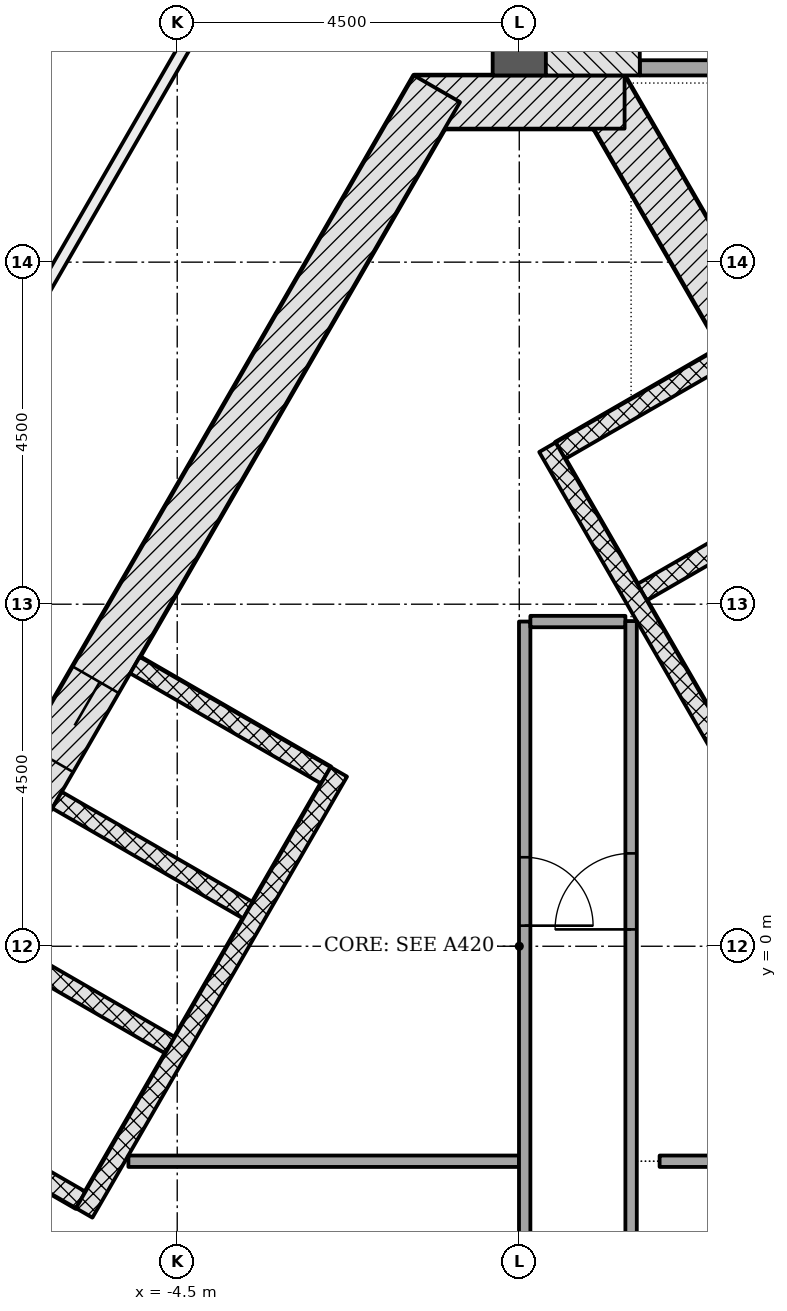
"""IFC4 building model, lengths in metres.
Left out: names, types, materials, properties, quantities, classifications, styles, units other than length and angle.
Written with IfcOpenShell. Run it as: python <this file> out.ifc"""

import sys

from ifc_helpers import new_model, si_unit, direction, frame, frame_2d, origin, place, context, subcontext, project, spatial, rectangle, extrude, element, fill, save


model = new_model("IFC4")
c1 = context("Model", 3, precision=1e-05, world=origin(), true_north=direction((0.0, 1.0)))
c2 = subcontext(c1, "Body", "Model", "MODEL_VIEW")
j1 = project(units=[si_unit("LENGTHUNIT", "METRE"), si_unit("PLANEANGLEUNIT", "RADIAN")], contexts=[c1])
p1 = place(None, origin())
s1 = spatial("IfcSite", under=j1, at=p1, CompositionType="ELEMENT")
p2 = place(p1, origin())
s2 = spatial("IfcBuilding", under=s1, at=p2, CompositionType="ELEMENT")
p3 = place(p2, frame((0.0, 0.0, 185.1)))
s3 = spatial("IfcBuildingStorey", under=s2, at=p3, CompositionType="ELEMENT", Elevation=185.1)
p4 = place(p3, frame((10.311, -4.703, -0.2), z_axis=(0.0, 0.0, 1.0), x_axis=(-0.500001446645, 0.866024568562, 0.0)))
e1 = element("IfcWall", 1, at=p4, inside=s3, PredefinedType="SHEAR", context=c2, shape_type="SweptSolid", body=[
    extrude(rectangle(XDim=18.458, YDim=0.7, at=frame_2d((9.229, 0.0))), origin(), (0.0, 0.0, 1.0), 3.6),
])
p5 = place(p4, frame((4.379, 0.0, 0.2)))
e2 = element("IfcOpeningElement", 2, at=p5, cuts=e1, PredefinedType="OPENING", context=c2, shape_type="SweptSolid", body=[
    extrude(rectangle(XDim=1.1, YDim=2.1, at=frame_2d((0.55, 1.05))), frame((0.0, 0.36, 0.0), z_axis=(0.0, -1.0, 0.0), x_axis=(1.0, 0.0, 0.0)), (0.0, 0.0, 1.0), 0.72),
])
p6 = place(p4, frame((6.529, 0.0, 0.2)))
e3 = element("IfcOpeningElement", 3, at=p6, cuts=e1, PredefinedType="OPENING", context=c2, shape_type="SweptSolid", body=[
    extrude(rectangle(XDim=1.1, YDim=2.1, at=frame_2d((0.55, 1.05))), frame((0.0, 0.36, 0.0), z_axis=(0.0, -1.0, 0.0), x_axis=(1.0, 0.0, 0.0)), (0.0, 0.0, 1.0), 0.72),
])
p7 = place(p4, frame((8.679, 0.0, 0.2)))
e4 = element("IfcOpeningElement", 4, at=p7, cuts=e1, PredefinedType="OPENING", context=c2, shape_type="SweptSolid", body=[
    extrude(rectangle(XDim=1.1, YDim=2.1, at=frame_2d((0.55, 1.05))), frame((0.0, 0.36, 0.0), z_axis=(0.0, -1.0, 0.0), x_axis=(1.0, 0.0, 0.0)), (0.0, 0.0, 1.0), 0.72),
])
p8 = place(p4, frame((10.829, 0.0, 0.2)))
e5 = element("IfcOpeningElement", 5, at=p8, cuts=e1, PredefinedType="OPENING", context=c2, shape_type="SweptSolid", body=[
    extrude(rectangle(XDim=1.1, YDim=2.1, at=frame_2d((0.55, 1.05))), frame((0.0, 0.36, 0.0), z_axis=(0.0, -1.0, 0.0), x_axis=(1.0, 0.0, 0.0)), (0.0, 0.0, 1.0), 0.72),
])
p9 = place(p4, frame((12.979, 0.0, 0.2)))
e6 = element("IfcOpeningElement", 6, at=p9, cuts=e1, PredefinedType="OPENING", context=c2, shape_type="SweptSolid", body=[
    extrude(rectangle(XDim=1.1, YDim=2.1, at=frame_2d((0.55, 1.05))), frame((0.0, 0.36, 0.0), z_axis=(0.0, -1.0, 0.0), x_axis=(1.0, 0.0, 0.0)), (0.0, 0.0, 1.0), 0.72),
])
p10 = place(p3, frame((1.386, 11.106, -0.2), z_axis=(0.0, 0.0, 1.0), x_axis=(-1.0, 0.0, 0.0)))
e7 = element("IfcWall", 7, at=p10, inside=s3, PredefinedType="SHEAR", context=c2, shape_type="SweptSolid", body=[
    extrude(rectangle(XDim=2.771, YDim=0.7, at=frame_2d((1.386, 0.0))), origin(), (0.0, 0.0, 1.0), 3.6),
])
p11 = place(p3, frame((-1.083, 11.281, -0.2), z_axis=(0.0, 0.0, 1.0), x_axis=(-0.500001446645, -0.866024568562, 0.0)))
e8 = element("IfcWall", 8, at=p11, inside=s3, PredefinedType="SHEAR", context=c2, shape_type="SweptSolid", body=[
    extrude(rectangle(XDim=18.458, YDim=0.7, at=frame_2d((9.229, 0.0))), origin(), (0.0, 0.0, 1.0), 3.6),
])
p12 = place(p11, frame((8.979, 0.0, 0.2)))
e9 = element("IfcOpeningElement", 9, at=p12, cuts=e8, PredefinedType="OPENING", context=c2, shape_type="SweptSolid", body=[
    extrude(rectangle(XDim=1.2, YDim=2.1, at=frame_2d((0.6, 1.05))), frame((0.0, 0.36, 0.0), z_axis=(0.0, -1.0, 0.0), x_axis=(1.0, 0.0, 0.0)), (0.0, 0.0, 1.0), 0.72),
])
p13 = place(p11, frame((11.029, 0.0, 0.2)))
e10 = element("IfcOpeningElement", 10, at=p13, cuts=e8, PredefinedType="OPENING", context=c2, shape_type="SweptSolid", body=[
    extrude(rectangle(XDim=1.2, YDim=2.1, at=frame_2d((0.6, 1.05))), frame((0.0, 0.36, 0.0), z_axis=(0.0, -1.0, 0.0), x_axis=(1.0, 0.0, 0.0)), (0.0, 0.0, 1.0), 0.72),
])
p14 = place(p3, frame((0.0, 11.456, -0.2), z_axis=(0.0, 0.0, 1.0), x_axis=(0.0, 1.0, 0.0)))
e11 = element("IfcWall", 11, at=p14, inside=s3, PredefinedType="SHEAR", context=c2, shape_type="SweptSolid", body=[
    extrude(rectangle(XDim=9.522, YDim=0.7, at=frame_2d((4.761, 0.0))), origin(), (0.0, 0.0, 1.0), 3.6),
])
for number, where, z_axis, x_axis in (
    (12, (3.781, 5.907, -0.2), (0.0, 0.0, 1.0), (-0.866, -0.5, 0.0)),
    (13, (2.706, 7.769, -0.2), (0.0, 0.0, 1.0), (-0.866, -0.5, 0.0)),
):
    element("IfcWall", number, at=place(p3, frame(where, z_axis=z_axis, x_axis=x_axis)), inside=s3, PredefinedType="PARTITIONING", context=c2, shape_type="SweptSolid", body=[
        extrude(rectangle(XDim=2.5, YDim=0.25, at=frame_2d((1.25, 0.0))), origin(), (0.0, 0.0, 1.0), 3.6),
    ])
p15 = place(p3, frame((5.87, -2.961, 0.0), z_axis=(0.0, 0.0, 1.0), x_axis=(-0.50000615651, 0.866021849293, 0.0)))
e14 = element("IfcWall", 14, at=p15, inside=s3, PredefinedType="PARTITIONING", context=c2, shape_type="SweptSolid", body=[
    extrude(rectangle(XDim=11.0, YDim=0.25, at=frame_2d((5.5, 0.0))), origin(), (0.0, 0.0, 1.0), 3.4),
])
for number, where, z_axis, x_axis in (
    (15, (-5.056, 3.699, -0.2), (0.0, 0.0, 1.0), (0.866, -0.5, 0.0)),
    (16, (-6.081, 1.923, -0.2), (0.0, 0.0, 1.0), (0.866, -0.5, 0.0)),
    (17, (-7.106, 0.148, -0.2), (0.0, 0.0, 1.0), (0.866, -0.5, 0.0)),
    (18, (-8.281, -1.887, -0.2), (0.0, 0.0, 1.0), (0.866, -0.5, 0.0)),
):
    element("IfcWall", number, at=place(p3, frame(where, z_axis=z_axis, x_axis=x_axis)), inside=s3, PredefinedType="PARTITIONING", context=c2, shape_type="SweptSolid", body=[
        extrude(rectangle(XDim=2.9, YDim=0.25, at=frame_2d((1.45, 0.0))), origin(), (0.0, 0.0, 1.0), 3.6),
    ])
p16 = place(p3, frame((-2.374, 2.294, 0.0), z_axis=(0.0, 0.0, 1.0), x_axis=(-0.500003174267, -0.866023571113, 0.0)))
e19 = element("IfcWall", 19, at=p16, inside=s3, PredefinedType="PARTITIONING", context=c2, shape_type="SweptSolid", body=[
    extrude(rectangle(XDim=6.7, YDim=0.25, at=frame_2d((3.35, 0.0))), origin(), (0.0, 0.0, 1.0), 3.4),
])
p17 = place(p3, frame((-5.142, -2.828, 0.0), z_axis=(0.0, 0.0, 1.0), x_axis=(1.0, 0.0, 0.0)))
e20 = element("IfcWall", 20, at=p17, inside=s3, PredefinedType="PARTITIONING", context=c2, shape_type="SweptSolid", body=[
    extrude(rectangle(XDim=5.139, YDim=0.15, at=frame_2d((2.569, 0.0))), origin(), (0.0, 0.0, 1.0), 3.4),
])
p18 = place(p3, frame((0.071, 4.272, 0.0), z_axis=(0.0, 0.0, 1.0), x_axis=(0.0, -1.0, 0.0)))
e21 = element("IfcWall", 21, at=p18, inside=s3, PredefinedType="PARTITIONING", context=c2, shape_type="SweptSolid", body=[
    extrude(rectangle(XDim=10.5, YDim=0.15, at=frame_2d((5.25, 0.0))), origin(), (0.0, 0.0, 1.0), 3.4),
])
p19 = place(p18, frame((3.101, 0.0, 0.0)))
e22 = element("IfcOpeningElement", 22, at=p19, cuts=e21, PredefinedType="OPENING", context=c2, shape_type="SweptSolid", body=[
    extrude(rectangle(XDim=0.9, YDim=2.1, at=frame_2d((0.45, 1.05))), frame((0.0, 0.085, 0.0), z_axis=(0.0, -1.0, 0.0), x_axis=(1.0, 0.0, 0.0)), (0.0, 0.0, 1.0), 0.17),
])
p20 = place(p3, frame((0.146, 4.272, 0.0), z_axis=(0.0, 0.0, 1.0), x_axis=(1.0, 0.0, 0.0)))
e23 = element("IfcWall", 23, at=p20, inside=s3, PredefinedType="PARTITIONING", context=c2, shape_type="SweptSolid", body=[
    extrude(rectangle(XDim=1.25, YDim=0.15, at=frame_2d((0.625, 0.0))), origin(), (0.0, 0.0, 1.0), 3.4),
])
p21 = place(p3, frame((1.471, -5.928, 0.0), z_axis=(0.0, 0.0, 1.0), x_axis=(0.0, 1.0, 0.0)))
e24 = element("IfcWall", 24, at=p21, inside=s3, PredefinedType="PARTITIONING", context=c2, shape_type="SweptSolid", body=[
    extrude(rectangle(XDim=10.206, YDim=0.15, at=frame_2d((5.103, 0.0))), origin(), (0.0, 0.0, 1.0), 3.4),
])
p22 = place(p21, frame((6.15, 0.0, 0.0)))
e25 = element("IfcOpeningElement", 25, at=p22, cuts=e24, PredefinedType="OPENING", context=c2, shape_type="SweptSolid", body=[
    extrude(rectangle(XDim=1.0, YDim=2.1, at=frame_2d((0.5, 1.05))), frame((0.0, 0.085, 0.0), z_axis=(0.0, -1.0, 0.0), x_axis=(1.0, 0.0, 0.0)), (0.0, 0.0, 1.0), 0.17),
])
p23 = place(p3, frame((1.846, -2.828, 0.0), z_axis=(0.0, 0.0, 1.0), x_axis=(1.0, 0.0, 0.0)))
e26 = element("IfcWall", 26, at=p23, inside=s3, PredefinedType="PARTITIONING", context=c2, shape_type="SweptSolid", body=[
    extrude(rectangle(XDim=3.758, YDim=0.15, at=frame_2d((1.879, 0.0))), origin(), (0.0, 0.0, 1.0), 3.4),
])
p24 = place(p3, frame((5.135, 11.556, -0.2), z_axis=(0.0, 0.0, 1.0), x_axis=(-1.0, 0.0, 0.0)))
e27 = element("IfcWall", 27, at=p24, inside=s3, PredefinedType="SHEAR", context=c2, shape_type="SweptSolid", body=[
    extrude(rectangle(XDim=3.55, YDim=0.2, at=frame_2d((1.775, 0.0))), origin(), (0.0, 0.0, 1.0), 3.6),
])
p25 = place(p24, frame((1.175, 0.0, 0.2)))
e28 = element("IfcOpeningElement", 28, at=p25, cuts=e27, PredefinedType="OPENING", context=c2, shape_type="SweptSolid", body=[
    extrude(rectangle(XDim=1.2, YDim=2.1, at=frame_2d((0.6, 1.05))), frame((0.0, 0.11, 0.0), z_axis=(0.0, -1.0, 0.0), x_axis=(1.0, 0.0, 0.0)), (0.0, 0.0, 1.0), 0.22),
])
p26 = place(p3, frame((0.968, 11.456, -0.2), z_axis=(0.0, 0.0, 1.0), x_axis=(0.0, 1.0, 0.0)))
e29 = element("IfcWall", 29, at=p26, inside=s3, PredefinedType="SHEAR", context=c2, shape_type="SweptSolid", body=[
    extrude(rectangle(XDim=7.2, YDim=1.236, at=frame_2d((3.6, 0.0))), origin(), (0.0, 0.0, 1.0), 3.6),
])
p27 = place(p3, frame((-0.35, 18.85, 0.0), z_axis=(0.0, 0.0, 1.0), x_axis=(-0.500005388685, -0.866022292603, 0.0)))
e30 = element("IfcWall", 30, at=p27, inside=s3, PredefinedType="PARTITIONING", context=c2, shape_type="SweptSolid", body=[
    extrude(rectangle(XDim=14.167, YDim=0.15, at=frame_2d((7.083, 0.0))), origin(), (0.0, 0.0, 1.0), 2.847),
])
p28 = place(p12, origin())
e31 = element("IfcDoor", 31, at=p28, inside=s3, OperationType="DOUBLE_DOOR_SLIDING", PredefinedType="DOOR", context=c2, shape_type="SweptSolid", body=[
    extrude(rectangle(XDim=1.2, YDim=2.1, at=frame_2d((0.6, 1.05))), frame((0.0, 0.025, 0.0), z_axis=(0.0, -1.0, 0.0), x_axis=(1.0, 0.0, 0.0)), (0.0, 0.0, 1.0), 0.05),
])
fill(e9, e31)
p29 = place(p19, origin())
e32 = element("IfcDoor", 32, at=p29, inside=s3, OperationType="SINGLE_SWING_RIGHT", PredefinedType="DOOR", context=c2, shape_type="SweptSolid", body=[
    extrude(rectangle(XDim=0.9, YDim=2.1, at=frame_2d((0.45, 1.05))), frame((0.0, 0.025, 0.0), z_axis=(0.0, -1.0, 0.0), x_axis=(1.0, 0.0, 0.0)), (0.0, 0.0, 1.0), 0.05),
])
fill(e22, e32)
p30 = place(p22, origin())
e33 = element("IfcDoor", 33, at=p30, inside=s3, OperationType="SINGLE_SWING_LEFT", PredefinedType="DOOR", context=c2, shape_type="SweptSolid", body=[
    extrude(rectangle(XDim=1.0, YDim=2.1, at=frame_2d((0.5, 1.05))), frame((0.0, 0.025, 0.0), z_axis=(0.0, -1.0, 0.0), x_axis=(1.0, 0.0, 0.0)), (0.0, 0.0, 1.0), 0.05),
])
fill(e25, e33)
save(model, sys.argv[1])
